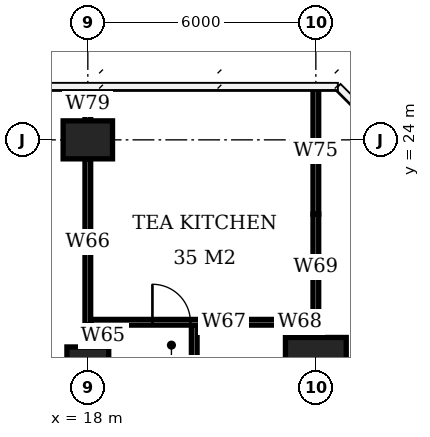
"""IFC4 building model, lengths in metres.
Left out: names, types, materials, properties, quantities, classifications, styles, units other than length and angle.
Written with IfcOpenShell. Run it as: python <this file> out.ifc"""

import sys

from ifc_helpers import new_model, si_unit, direction, frame, frame_2d, origin, origin_2d, place, context, subcontext, project, spatial, rectangle, extrude, element, fill, save


model = new_model("IFC4")
c1 = context("Model", 3, precision=1e-05, world=origin(), true_north=direction((0.0, 1.0)))
c2 = subcontext(c1, "Body", "Model", "MODEL_VIEW")
j1 = project(units=[si_unit("LENGTHUNIT", "METRE"), si_unit("PLANEANGLEUNIT", "RADIAN")], contexts=[c1])
p1 = place(None, origin())
s1 = spatial("IfcSite", under=j1, at=p1, CompositionType="ELEMENT")
p2 = place(p1, origin())
s2 = spatial("IfcBuilding", under=s1, at=p2, CompositionType="ELEMENT")
p3 = place(p2, frame((0.0, 0.0, 260.6)))
s3 = spatial("IfcBuildingStorey", under=s2, at=p3, CompositionType="ELEMENT", Elevation=260.6)
p4 = place(p3, frame((18.0, 18.0, 0.0), z_axis=(0.0, 0.0, 1.0), x_axis=(1.0, 0.0, 0.0)))
e1 = element("IfcColumn", 1, at=p4, inside=s3, PredefinedType="COLUMN", context=c2, shape_type="SweptSolid", body=[
    extrude(rectangle(XDim=1.1, YDim=1.1, at=origin_2d()), origin(), (0.0, 0.0, 1.0), 3.9),
])
p5 = place(p3, frame((18.0, 24.0, 0.0), z_axis=(0.0, 0.0, 1.0), x_axis=(1.0, 0.0, 0.0)))
e2 = element("IfcColumn", 2, at=p5, inside=s3, PredefinedType="COLUMN", context=c2, shape_type="SweptSolid", body=[
    extrude(rectangle(XDim=1.3, YDim=1.0, at=origin_2d()), origin(), (0.0, 0.0, 1.0), 3.9),
])
p6 = place(p3, frame((24.0, 18.0, 0.0), z_axis=(0.0, 0.0, 1.0), x_axis=(1.0, 0.0, 0.0)))
e3 = element("IfcColumn", 3, at=p6, inside=s3, PredefinedType="COLUMN", context=c2, shape_type="SweptSolid", body=[
    extrude(rectangle(XDim=1.6, YDim=1.6, at=origin_2d()), origin(), (0.0, 0.0, 1.0), 3.9),
])
p7 = place(p3, frame((18.075, 19.2, 0.0), z_axis=(0.0, 0.0, 1.0), x_axis=(1.0, 0.0, 0.0)))
e4 = element("IfcWall", 4, at=p7, inside=s3, PredefinedType="PARTITIONING", context=c2, shape_type="SweptSolid", body=[
    extrude(rectangle(XDim=5.015, YDim=0.15, at=frame_2d((2.508, 0.0))), origin(), (0.0, 0.0, 1.0), 3.65),
])
p8 = place(p7, frame((1.625, 0.0, 0.0)))
e5 = element("IfcOpeningElement", 5, at=p8, cuts=e4, PredefinedType="OPENING", context=c2, shape_type="SweptSolid", body=[
    extrude(rectangle(XDim=1.0, YDim=2.4, at=frame_2d((0.5, 1.2))), frame((0.0, 0.085, 0.0), z_axis=(0.0, -1.0, 0.0), x_axis=(1.0, 0.0, 0.0)), (0.0, 0.0, 1.0), 0.17),
])
p9 = place(p3, frame((23.09, 19.2, 0.0), z_axis=(0.0, 0.0, 1.0), x_axis=(1.0, 0.0, 0.0)))
e6 = element("IfcWall", 6, at=p9, inside=s3, PredefinedType="PARTITIONING", context=c2, shape_type="SweptSolid", body=[
    extrude(rectangle(XDim=0.985, YDim=0.15, at=frame_2d((0.492, 0.0))), origin(), (0.0, 0.0, 1.0), 2.65),
])
p10 = place(p3, frame((18.0, 19.125, 0.0), z_axis=(0.0, 0.0, 1.0), x_axis=(0.0, 1.0, 0.0)))
e7 = element("IfcWall", 7, at=p10, inside=s3, PredefinedType="PARTITIONING", context=c2, shape_type="SweptSolid", body=[
    extrude(rectangle(XDim=4.375, YDim=0.15, at=frame_2d((2.188, 0.0))), origin(), (0.0, 0.0, 1.0), 3.65),
])
p11 = place(p3, frame((18.0, 24.5, 0.0), z_axis=(0.0, 0.0, 1.0), x_axis=(0.0, 1.0, 0.0)))
e8 = element("IfcWall", 8, at=p11, inside=s3, PredefinedType="PARTITIONING", context=c2, shape_type="SweptSolid", body=[
    extrude(rectangle(XDim=0.875, YDim=0.15, at=frame_2d((0.438, 0.0))), origin(), (0.0, 0.0, 1.0), 3.65),
])
p12 = place(p3, frame((24.0, 19.275, 0.0), z_axis=(0.0, 0.0, 1.0), x_axis=(0.0, 1.0, 0.0)))
e9 = element("IfcWall", 9, at=p12, inside=s3, PredefinedType="PARTITIONING", context=c2, shape_type="SweptSolid", body=[
    extrude(rectangle(XDim=2.77, YDim=0.15, at=frame_2d((1.385, 0.0))), origin(), (0.0, 0.0, 1.0), 2.65),
])
p13 = place(p3, frame((24.0, 22.045, 0.0), z_axis=(0.0, 0.0, 1.0), x_axis=(0.0, 1.0, 0.0)))
e10 = element("IfcWall", 10, at=p13, inside=s3, PredefinedType="PARTITIONING", context=c2, shape_type="SweptSolid", body=[
    extrude(rectangle(XDim=3.33, YDim=0.15, at=frame_2d((1.665, 0.0))), origin(), (0.0, 0.0, 1.0), 3.65),
])
p14 = place(p3, frame((18.4, 18.55, 0.0), z_axis=(0.0, 0.0, 1.0), x_axis=(0.0, 1.0, 0.0)))
e11 = element("IfcWall", 11, at=p14, inside=s3, PredefinedType="PARTITIONING", context=c2, shape_type="SweptSolid", body=[
    extrude(rectangle(XDim=0.575, YDim=0.15, at=frame_2d((0.288, 0.0))), origin(), (0.0, 0.0, 1.0), 3.65),
])
p15 = place(p3, frame((20.8, 10.575, 0.0), z_axis=(0.0, 0.0, 1.0), x_axis=(0.0, 1.0, 0.0)))
e12 = element("IfcWall", 12, at=p15, inside=s3, PredefinedType="PARTITIONING", context=c2, shape_type="SweptSolid", body=[
    extrude(rectangle(XDim=8.55, YDim=0.15, at=frame_2d((4.275, 0.0))), origin(), (0.0, 0.0, 1.0), 3.65),
])
p16 = place(p15, frame((5.031, 0.0, 0.0)))
e13 = element("IfcOpeningElement", 13, at=p16, cuts=e12, PredefinedType="OPENING", context=c2, shape_type="SweptSolid", body=[
    extrude(rectangle(XDim=1.0, YDim=2.4, at=frame_2d((0.5, 1.2))), frame((0.0, 0.085, 0.0), z_axis=(0.0, -1.0, 0.0), x_axis=(1.0, 0.0, 0.0)), (0.0, 0.0, 1.0), 0.17),
])
p17 = place(p8, origin())
e14 = element("IfcDoor", 14, at=p17, inside=s3, OperationType="SINGLE_SWING_LEFT", PredefinedType="DOOR", context=c2, shape_type="SweptSolid", body=[
    extrude(rectangle(XDim=1.0, YDim=2.4, at=frame_2d((0.5, 1.2))), frame((0.0, 0.025, 0.0), z_axis=(0.0, -1.0, 0.0), x_axis=(1.0, 0.0, 0.0)), (0.0, 0.0, 1.0), 0.05),
])
fill(e5, e14)
save(model, sys.argv[1])
